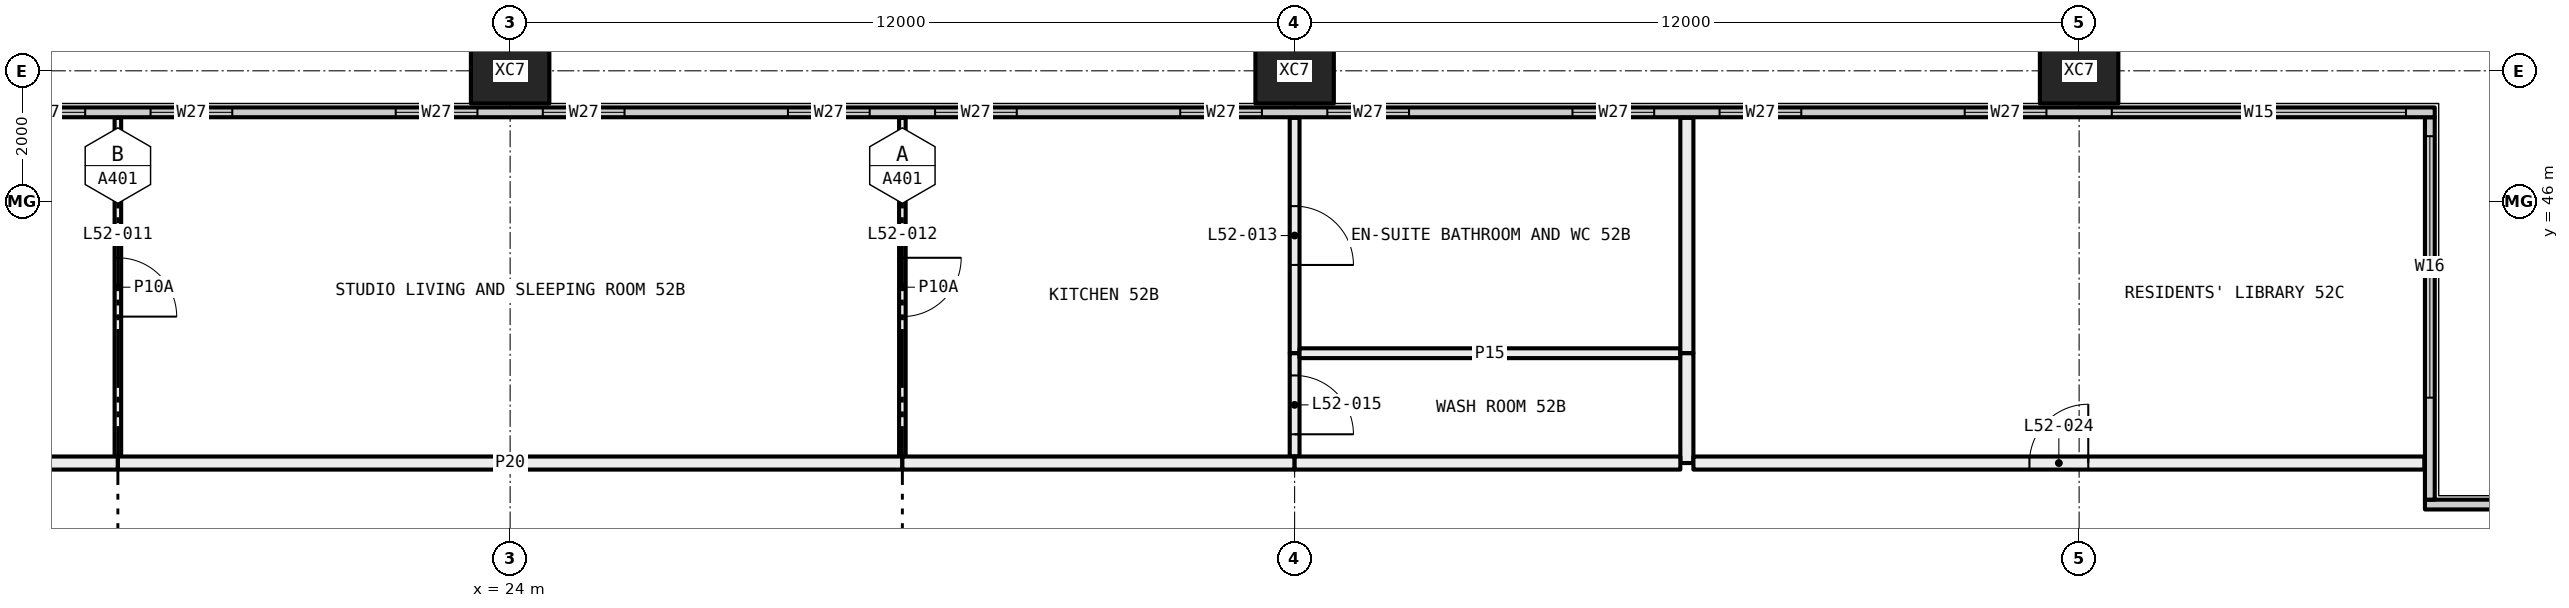
"""IFC4 building model, lengths in metres.
Left out: names, types, materials, properties, quantities, classifications, styles, units other than length and angle.
Written with IfcOpenShell. Run it as: python <this file> out.ifc"""

import sys

from ifc_helpers import new_model, si_unit, direction, frame, frame_2d, origin, origin_2d, place, context, subcontext, project, spatial, rectangle, hollow_rectangle, extrude, element, fill, save


model = new_model("IFC4")
c1 = context("Model", 3, precision=1e-05, world=origin(), true_north=direction((0.0, 1.0)))
c2 = subcontext(c1, "Body", "Model", "MODEL_VIEW")
j1 = project(units=[si_unit("LENGTHUNIT", "METRE"), si_unit("PLANEANGLEUNIT", "RADIAN")], contexts=[c1])
p1 = place(None, origin())
s1 = spatial("IfcSite", under=j1, at=p1, CompositionType="ELEMENT")
p2 = place(p1, origin())
s2 = spatial("IfcBuilding", under=s1, at=p2, CompositionType="ELEMENT")
p3 = place(p2, frame((0.0, 0.0, 196.2)))
s3 = spatial("IfcBuildingStorey", under=s2, at=p3, CompositionType="ELEMENT", Elevation=196.2)
for number, where, z_axis, x_axis in (
    (1, (24.0, 48.0, -0.4), (0.0, 0.0, 1.0), (1.0, 0.0, 0.0)),
    (2, (36.0, 48.0, -0.4), (0.0, 0.0, 1.0), (1.0, 0.0, 0.0)),
    (3, (48.0, 48.0, -0.4), (0.0, 0.0, 1.0), (1.0, 0.0, 0.0)),
):
    element("IfcColumn", number, at=place(p3, frame(where, z_axis=z_axis, x_axis=x_axis)), inside=s3, PredefinedType="COLUMN", context=c2, shape_type="SweptSolid", body=[
        extrude(hollow_rectangle(XDim=1.2, YDim=1.0, WallThickness=0.045, at=origin_2d()), origin(), (0.0, 0.0, 1.0), 3.45),
    ])
p4 = place(p3, frame((53.29, 41.365, 0.0), z_axis=(0.0, 0.0, 1.0), x_axis=(1.0, 0.0, 0.0)))
e4 = element("IfcWall", 4, at=p4, inside=s3, PredefinedType="ELEMENTEDWALL", context=c2, shape_type="SweptSolid", body=[
    extrude(rectangle(XDim=6.15, YDim=0.15, at=frame_2d((3.075, 0.0))), origin(), (0.0, 0.0, 1.0), 3.05),
])
p5 = place(p4, frame((1.71, 0.0, 0.45)))
e5 = element("IfcOpeningElement", 5, at=p5, cuts=e4, PredefinedType="OPENING", context=c2, shape_type="SweptSolid", body=[
    extrude(rectangle(XDim=4.0, YDim=2.55, at=frame_2d((2.0, 1.275))), frame((0.0, 0.085, 0.0), z_axis=(0.0, -1.0, 0.0), x_axis=(1.0, 0.0, 0.0)), (0.0, 0.0, 1.0), 0.17),
])
p6 = place(p3, frame((53.365, 41.44, 0.0), z_axis=(0.0, 0.0, 1.0), x_axis=(0.0, 1.0, 0.0)))
e6 = element("IfcWall", 6, at=p6, inside=s3, PredefinedType="ELEMENTEDWALL", context=c2, shape_type="SweptSolid", body=[
    extrude(rectangle(XDim=5.85, YDim=0.15, at=frame_2d((2.925, 0.0))), origin(), (0.0, 0.0, 1.0), 3.05),
])
p7 = place(p6, frame((1.56, 0.0, 0.45)))
e7 = element("IfcOpeningElement", 7, at=p7, cuts=e6, PredefinedType="OPENING", context=c2, shape_type="SweptSolid", body=[
    extrude(rectangle(XDim=4.0, YDim=2.55, at=frame_2d((2.0, 1.275))), frame((0.0, 0.085, 0.0), z_axis=(0.0, -1.0, 0.0), x_axis=(1.0, 0.0, 0.0)), (0.0, 0.0, 1.0), 0.17),
])
p8 = place(p3, frame((6.56, 47.365, 0.0), z_axis=(0.0, 0.0, 1.0), x_axis=(1.0, 0.0, 0.0)))
e8 = element("IfcWall", 8, at=p8, inside=s3, PredefinedType="ELEMENTEDWALL", context=c2, shape_type="SweptSolid", body=[
    extrude(rectangle(XDim=46.88, YDim=0.15, at=frame_2d((23.44, 0.0))), origin(), (0.0, 0.0, 1.0), 3.05),
])
p9 = place(p8, frame((0.44, 0.0, 0.45)))
e9 = element("IfcOpeningElement", 9, at=p9, cuts=e8, PredefinedType="OPENING", context=c2, shape_type="SweptSolid", body=[
    extrude(rectangle(XDim=4.5, YDim=2.55, at=frame_2d((2.25, 1.275))), frame((0.0, 0.085, 0.0), z_axis=(0.0, -1.0, 0.0), x_axis=(1.0, 0.0, 0.0)), (0.0, 0.0, 1.0), 0.17),
])
p10 = place(p8, frame((5.94, 0.0, 0.45)))
e10 = element("IfcOpeningElement", 10, at=p10, cuts=e8, PredefinedType="OPENING", context=c2, shape_type="SweptSolid", body=[
    extrude(rectangle(XDim=1.25, YDim=2.55, at=frame_2d((0.625, 1.275))), frame((0.0, 0.085, 0.0), z_axis=(0.0, -1.0, 0.0), x_axis=(1.0, 0.0, 0.0)), (0.0, 0.0, 1.0), 0.17),
])
p11 = place(p8, frame((9.69, 0.0, 0.45)))
e11 = element("IfcOpeningElement", 11, at=p11, cuts=e8, PredefinedType="OPENING", context=c2, shape_type="SweptSolid", body=[
    extrude(rectangle(XDim=1.25, YDim=2.55, at=frame_2d((0.625, 1.275))), frame((0.0, 0.085, 0.0), z_axis=(0.0, -1.0, 0.0), x_axis=(1.0, 0.0, 0.0)), (0.0, 0.0, 1.0), 0.17),
])
p12 = place(p8, frame((11.94, 0.0, 0.45)))
e12 = element("IfcOpeningElement", 12, at=p12, cuts=e8, PredefinedType="OPENING", context=c2, shape_type="SweptSolid", body=[
    extrude(rectangle(XDim=1.25, YDim=2.55, at=frame_2d((0.625, 1.275))), frame((0.0, 0.085, 0.0), z_axis=(0.0, -1.0, 0.0), x_axis=(1.0, 0.0, 0.0)), (0.0, 0.0, 1.0), 0.17),
])
p13 = place(p8, frame((15.69, 0.0, 0.45)))
e13 = element("IfcOpeningElement", 13, at=p13, cuts=e8, PredefinedType="OPENING", context=c2, shape_type="SweptSolid", body=[
    extrude(rectangle(XDim=1.25, YDim=2.55, at=frame_2d((0.625, 1.275))), frame((0.0, 0.085, 0.0), z_axis=(0.0, -1.0, 0.0), x_axis=(1.0, 0.0, 0.0)), (0.0, 0.0, 1.0), 0.17),
])
p14 = place(p8, frame((17.94, 0.0, 0.45)))
e14 = element("IfcOpeningElement", 14, at=p14, cuts=e8, PredefinedType="OPENING", context=c2, shape_type="SweptSolid", body=[
    extrude(rectangle(XDim=1.25, YDim=2.55, at=frame_2d((0.625, 1.275))), frame((0.0, 0.085, 0.0), z_axis=(0.0, -1.0, 0.0), x_axis=(1.0, 0.0, 0.0)), (0.0, 0.0, 1.0), 0.17),
])
p15 = place(p8, frame((21.69, 0.0, 0.45)))
e15 = element("IfcOpeningElement", 15, at=p15, cuts=e8, PredefinedType="OPENING", context=c2, shape_type="SweptSolid", body=[
    extrude(rectangle(XDim=1.25, YDim=2.55, at=frame_2d((0.625, 1.275))), frame((0.0, 0.085, 0.0), z_axis=(0.0, -1.0, 0.0), x_axis=(1.0, 0.0, 0.0)), (0.0, 0.0, 1.0), 0.17),
])
p16 = place(p8, frame((23.94, 0.0, 0.45)))
e16 = element("IfcOpeningElement", 16, at=p16, cuts=e8, PredefinedType="OPENING", context=c2, shape_type="SweptSolid", body=[
    extrude(rectangle(XDim=1.25, YDim=2.55, at=frame_2d((0.625, 1.275))), frame((0.0, 0.085, 0.0), z_axis=(0.0, -1.0, 0.0), x_axis=(1.0, 0.0, 0.0)), (0.0, 0.0, 1.0), 0.17),
])
p17 = place(p8, frame((27.69, 0.0, 0.45)))
e17 = element("IfcOpeningElement", 17, at=p17, cuts=e8, PredefinedType="OPENING", context=c2, shape_type="SweptSolid", body=[
    extrude(rectangle(XDim=1.25, YDim=2.55, at=frame_2d((0.625, 1.275))), frame((0.0, 0.085, 0.0), z_axis=(0.0, -1.0, 0.0), x_axis=(1.0, 0.0, 0.0)), (0.0, 0.0, 1.0), 0.17),
])
p18 = place(p8, frame((29.94, 0.0, 0.45)))
e18 = element("IfcOpeningElement", 18, at=p18, cuts=e8, PredefinedType="OPENING", context=c2, shape_type="SweptSolid", body=[
    extrude(rectangle(XDim=1.25, YDim=2.55, at=frame_2d((0.625, 1.275))), frame((0.0, 0.085, 0.0), z_axis=(0.0, -1.0, 0.0), x_axis=(1.0, 0.0, 0.0)), (0.0, 0.0, 1.0), 0.17),
])
p19 = place(p8, frame((33.69, 0.0, 0.45)))
e19 = element("IfcOpeningElement", 19, at=p19, cuts=e8, PredefinedType="OPENING", context=c2, shape_type="SweptSolid", body=[
    extrude(rectangle(XDim=1.25, YDim=2.55, at=frame_2d((0.625, 1.275))), frame((0.0, 0.085, 0.0), z_axis=(0.0, -1.0, 0.0), x_axis=(1.0, 0.0, 0.0)), (0.0, 0.0, 1.0), 0.17),
])
p20 = place(p8, frame((35.94, 0.0, 0.45)))
e20 = element("IfcOpeningElement", 20, at=p20, cuts=e8, PredefinedType="OPENING", context=c2, shape_type="SweptSolid", body=[
    extrude(rectangle(XDim=1.25, YDim=2.55, at=frame_2d((0.625, 1.275))), frame((0.0, 0.085, 0.0), z_axis=(0.0, -1.0, 0.0), x_axis=(1.0, 0.0, 0.0)), (0.0, 0.0, 1.0), 0.17),
])
p21 = place(p8, frame((39.69, 0.0, 0.45)))
e21 = element("IfcOpeningElement", 21, at=p21, cuts=e8, PredefinedType="OPENING", context=c2, shape_type="SweptSolid", body=[
    extrude(rectangle(XDim=1.25, YDim=2.55, at=frame_2d((0.625, 1.275))), frame((0.0, 0.085, 0.0), z_axis=(0.0, -1.0, 0.0), x_axis=(1.0, 0.0, 0.0)), (0.0, 0.0, 1.0), 0.17),
])
p22 = place(p8, frame((41.94, 0.0, 0.45)))
e22 = element("IfcOpeningElement", 22, at=p22, cuts=e8, PredefinedType="OPENING", context=c2, shape_type="SweptSolid", body=[
    extrude(rectangle(XDim=4.5, YDim=2.55, at=frame_2d((2.25, 1.275))), frame((0.0, 0.085, 0.0), z_axis=(0.0, -1.0, 0.0), x_axis=(1.0, 0.0, 0.0)), (0.0, 0.0, 1.0), 0.17),
])
p23 = place(p3, frame((18.0, 42.1, 0.0), z_axis=(0.0, 0.0, 1.0), x_axis=(0.0, 1.0, 0.0)))
e23 = element("IfcWall", 23, at=p23, inside=s3, PredefinedType="PARTITIONING", context=c2, shape_type="SweptSolid", body=[
    extrude(rectangle(XDim=5.18, YDim=0.1, at=frame_2d((2.59, 0.0))), origin(), (0.0, 0.0, 1.0), 3.05),
])
p24 = place(p23, frame((2.14, 0.0, 0.0)))
e24 = element("IfcOpeningElement", 24, at=p24, cuts=e23, PredefinedType="OPENING", context=c2, shape_type="SweptSolid", body=[
    extrude(rectangle(XDim=0.9, YDim=2.1, at=frame_2d((0.45, 1.05))), frame((0.0, 0.06, 0.0), z_axis=(0.0, -1.0, 0.0), x_axis=(1.0, 0.0, 0.0)), (0.0, 0.0, 1.0), 0.12),
])
p25 = place(p3, frame((12.0, 42.0, 0.0), z_axis=(0.0, 0.0, 1.0), x_axis=(1.0, 0.0, 0.0)))
e25 = element("IfcWall", 25, at=p25, inside=s3, PredefinedType="PARTITIONING", context=c2, shape_type="SweptSolid", body=[
    extrude(rectangle(XDim=6.0, YDim=0.2, at=frame_2d((3.0, 0.0))), origin(), (0.0, 0.0, 1.0), 3.05),
])
p26 = place(p25, frame((2.5, 0.0, 0.0)))
e26 = element("IfcOpeningElement", 26, at=p26, cuts=e25, PredefinedType="OPENING", context=c2, shape_type="SweptSolid", body=[
    extrude(rectangle(XDim=1.0, YDim=2.1, at=frame_2d((0.5, 1.05))), frame((0.0, 0.11, 0.0), z_axis=(0.0, -1.0, 0.0), x_axis=(1.0, 0.0, 0.0)), (0.0, 0.0, 1.0), 0.22),
])
p27 = place(p3, frame((30.0, 42.1, 0.0), z_axis=(0.0, 0.0, 1.0), x_axis=(0.0, 1.0, 0.0)))
e27 = element("IfcWall", 27, at=p27, inside=s3, PredefinedType="PARTITIONING", context=c2, shape_type="SweptSolid", body=[
    extrude(rectangle(XDim=5.18, YDim=0.1, at=frame_2d((2.59, 0.0))), origin(), (0.0, 0.0, 1.0), 3.05),
])
p28 = place(p27, frame((2.14, 0.0, 0.0)))
e28 = element("IfcOpeningElement", 28, at=p28, cuts=e27, PredefinedType="OPENING", context=c2, shape_type="SweptSolid", body=[
    extrude(rectangle(XDim=0.9, YDim=2.1, at=frame_2d((0.45, 1.05))), frame((0.0, 0.06, 0.0), z_axis=(0.0, -1.0, 0.0), x_axis=(1.0, 0.0, 0.0)), (0.0, 0.0, 1.0), 0.12),
])
p29 = place(p3, frame((18.0, 42.0, 0.0), z_axis=(0.0, 0.0, 1.0), x_axis=(1.0, 0.0, 0.0)))
e29 = element("IfcWall", 29, at=p29, inside=s3, PredefinedType="PARTITIONING", context=c2, shape_type="SweptSolid", body=[
    extrude(rectangle(XDim=12.0, YDim=0.2, at=frame_2d((6.0, 0.0))), origin(), (0.0, 0.0, 1.0), 3.05),
])
p30 = place(p3, frame((36.0, 43.68, 0.0), z_axis=(0.0, 0.0, 1.0), x_axis=(0.0, 1.0, 0.0)))
e30 = element("IfcWall", 30, at=p30, inside=s3, PredefinedType="PARTITIONING", context=c2, shape_type="SweptSolid", body=[
    extrude(rectangle(XDim=3.6, YDim=0.15, at=frame_2d((1.8, 0.0))), origin(), (0.0, 0.0, 1.0), 2.45),
])
p31 = place(p30, frame((1.35, 0.0, 0.0)))
e31 = element("IfcOpeningElement", 31, at=p31, cuts=e30, PredefinedType="OPENING", context=c2, shape_type="SweptSolid", body=[
    extrude(rectangle(XDim=0.9, YDim=2.1, at=frame_2d((0.45, 1.05))), frame((0.0, 0.085, 0.0), z_axis=(0.0, -1.0, 0.0), x_axis=(1.0, 0.0, 0.0)), (0.0, 0.0, 1.0), 0.17),
])
p32 = place(p3, frame((36.0, 42.1, 0.0), z_axis=(0.0, 0.0, 1.0), x_axis=(0.0, 1.0, 0.0)))
e32 = element("IfcWall", 32, at=p32, inside=s3, PredefinedType="PARTITIONING", context=c2, shape_type="SweptSolid", body=[
    extrude(rectangle(XDim=1.58, YDim=0.15, at=frame_2d((0.79, 0.0))), origin(), (0.0, 0.0, 1.0), 2.45),
])
p33 = place(p32, frame((0.34, 0.0, 0.0)))
e33 = element("IfcOpeningElement", 33, at=p33, cuts=e32, PredefinedType="OPENING", context=c2, shape_type="SweptSolid", body=[
    extrude(rectangle(XDim=0.9, YDim=2.1, at=frame_2d((0.45, 1.05))), frame((0.0, 0.085, 0.0), z_axis=(0.0, -1.0, 0.0), x_axis=(1.0, 0.0, 0.0)), (0.0, 0.0, 1.0), 0.17),
])
p34 = place(p3, frame((30.0, 42.0, 0.0), z_axis=(0.0, 0.0, 1.0), x_axis=(1.0, 0.0, 0.0)))
e34 = element("IfcWall", 34, at=p34, inside=s3, PredefinedType="PARTITIONING", context=c2, shape_type="SweptSolid", body=[
    extrude(rectangle(XDim=6.0, YDim=0.2, at=frame_2d((3.0, 0.0))), origin(), (0.0, 0.0, 1.0), 2.45),
])
p35 = place(p3, frame((36.075, 43.68, 0.0), z_axis=(0.0, 0.0, 1.0), x_axis=(1.0, 0.0, 0.0)))
e35 = element("IfcWall", 35, at=p35, inside=s3, PredefinedType="PARTITIONING", context=c2, shape_type="SweptSolid", body=[
    extrude(rectangle(XDim=5.825, YDim=0.15, at=frame_2d((2.913, 0.0))), origin(), (0.0, 0.0, 1.0), 2.45),
])
p36 = place(p3, frame((42.0, 43.68, 0.0), z_axis=(0.0, 0.0, 1.0), x_axis=(0.0, 1.0, 0.0)))
e36 = element("IfcWall", 36, at=p36, inside=s3, PredefinedType="PARTITIONING", context=c2, shape_type="SweptSolid", body=[
    extrude(rectangle(XDim=3.6, YDim=0.2, at=frame_2d((1.8, 0.0))), origin(), (0.0, 0.0, 1.0), 3.05),
])
p37 = place(p3, frame((42.0, 42.0, 0.0), z_axis=(0.0, 0.0, 1.0), x_axis=(0.0, 1.0, 0.0)))
e37 = element("IfcWall", 37, at=p37, inside=s3, PredefinedType="PARTITIONING", context=c2, shape_type="SweptSolid", body=[
    extrude(rectangle(XDim=1.68, YDim=0.2, at=frame_2d((0.84, 0.0))), origin(), (0.0, 0.0, 1.0), 3.05),
])
p38 = place(p3, frame((36.0, 42.0, 0.0), z_axis=(0.0, 0.0, 1.0), x_axis=(1.0, 0.0, 0.0)))
e38 = element("IfcWall", 38, at=p38, inside=s3, PredefinedType="PARTITIONING", context=c2, shape_type="SweptSolid", body=[
    extrude(rectangle(XDim=5.9, YDim=0.2, at=frame_2d((2.95, 0.0))), origin(), (0.0, 0.0, 1.0), 2.45),
])
p39 = place(p3, frame((42.1, 42.0, 0.0), z_axis=(0.0, 0.0, 1.0), x_axis=(1.0, 0.0, 0.0)))
e39 = element("IfcWall", 39, at=p39, inside=s3, PredefinedType="PARTITIONING", context=c2, shape_type="SweptSolid", body=[
    extrude(rectangle(XDim=11.18, YDim=0.2, at=frame_2d((5.59, 0.0))), origin(), (0.0, 0.0, 1.0), 3.05),
])
p40 = place(p39, frame((5.14, 0.0, 0.0)))
e40 = element("IfcOpeningElement", 40, at=p40, cuts=e39, PredefinedType="OPENING", context=c2, shape_type="SweptSolid", body=[
    extrude(rectangle(XDim=0.9, YDim=2.1, at=frame_2d((0.45, 1.05))), frame((0.0, 0.11, 0.0), z_axis=(0.0, -1.0, 0.0), x_axis=(1.0, 0.0, 0.0)), (0.0, 0.0, 1.0), 0.22),
])
p41 = place(p7, origin())
e41 = element("IfcWindow", 41, at=p41, inside=s3, PartitioningType="SINGLE_PANEL", PredefinedType="WINDOW", context=c2, shape_type="SweptSolid", body=[
    extrude(rectangle(XDim=4.0, YDim=2.55, at=frame_2d((2.0, 1.275))), frame((0.0, 0.03, 0.0), z_axis=(0.0, -1.0, 0.0), x_axis=(1.0, 0.0, 0.0)), (0.0, 0.0, 1.0), 0.06),
])
fill(e7, e41)
p42 = place(p11, origin())
e42 = element("IfcWindow", 42, at=p42, inside=s3, PartitioningType="SINGLE_PANEL", PredefinedType="WINDOW", context=c2, shape_type="SweptSolid", body=[
    extrude(rectangle(XDim=1.25, YDim=2.55, at=frame_2d((0.625, 1.275))), frame((0.0, 0.03, 0.0), z_axis=(0.0, -1.0, 0.0), x_axis=(1.0, 0.0, 0.0)), (0.0, 0.0, 1.0), 0.06),
])
fill(e11, e42)
p43 = place(p12, origin())
e43 = element("IfcWindow", 43, at=p43, inside=s3, PartitioningType="SINGLE_PANEL", PredefinedType="WINDOW", context=c2, shape_type="SweptSolid", body=[
    extrude(rectangle(XDim=1.25, YDim=2.55, at=frame_2d((0.625, 1.275))), frame((0.0, 0.03, 0.0), z_axis=(0.0, -1.0, 0.0), x_axis=(1.0, 0.0, 0.0)), (0.0, 0.0, 1.0), 0.06),
])
fill(e12, e43)
p44 = place(p13, origin())
e44 = element("IfcWindow", 44, at=p44, inside=s3, PartitioningType="SINGLE_PANEL", PredefinedType="WINDOW", context=c2, shape_type="SweptSolid", body=[
    extrude(rectangle(XDim=1.25, YDim=2.55, at=frame_2d((0.625, 1.275))), frame((0.0, 0.03, 0.0), z_axis=(0.0, -1.0, 0.0), x_axis=(1.0, 0.0, 0.0)), (0.0, 0.0, 1.0), 0.06),
])
fill(e13, e44)
p45 = place(p14, origin())
e45 = element("IfcWindow", 45, at=p45, inside=s3, PartitioningType="SINGLE_PANEL", PredefinedType="WINDOW", context=c2, shape_type="SweptSolid", body=[
    extrude(rectangle(XDim=1.25, YDim=2.55, at=frame_2d((0.625, 1.275))), frame((0.0, 0.03, 0.0), z_axis=(0.0, -1.0, 0.0), x_axis=(1.0, 0.0, 0.0)), (0.0, 0.0, 1.0), 0.06),
])
fill(e14, e45)
p46 = place(p15, origin())
e46 = element("IfcWindow", 46, at=p46, inside=s3, PartitioningType="SINGLE_PANEL", PredefinedType="WINDOW", context=c2, shape_type="SweptSolid", body=[
    extrude(rectangle(XDim=1.25, YDim=2.55, at=frame_2d((0.625, 1.275))), frame((0.0, 0.03, 0.0), z_axis=(0.0, -1.0, 0.0), x_axis=(1.0, 0.0, 0.0)), (0.0, 0.0, 1.0), 0.06),
])
fill(e15, e46)
p47 = place(p16, origin())
e47 = element("IfcWindow", 47, at=p47, inside=s3, PartitioningType="SINGLE_PANEL", PredefinedType="WINDOW", context=c2, shape_type="SweptSolid", body=[
    extrude(rectangle(XDim=1.25, YDim=2.55, at=frame_2d((0.625, 1.275))), frame((0.0, 0.03, 0.0), z_axis=(0.0, -1.0, 0.0), x_axis=(1.0, 0.0, 0.0)), (0.0, 0.0, 1.0), 0.06),
])
fill(e16, e47)
p48 = place(p17, origin())
e48 = element("IfcWindow", 48, at=p48, inside=s3, PartitioningType="SINGLE_PANEL", PredefinedType="WINDOW", context=c2, shape_type="SweptSolid", body=[
    extrude(rectangle(XDim=1.25, YDim=2.55, at=frame_2d((0.625, 1.275))), frame((0.0, 0.03, 0.0), z_axis=(0.0, -1.0, 0.0), x_axis=(1.0, 0.0, 0.0)), (0.0, 0.0, 1.0), 0.06),
])
fill(e17, e48)
p49 = place(p18, origin())
e49 = element("IfcWindow", 49, at=p49, inside=s3, PartitioningType="SINGLE_PANEL", PredefinedType="WINDOW", context=c2, shape_type="SweptSolid", body=[
    extrude(rectangle(XDim=1.25, YDim=2.55, at=frame_2d((0.625, 1.275))), frame((0.0, 0.03, 0.0), z_axis=(0.0, -1.0, 0.0), x_axis=(1.0, 0.0, 0.0)), (0.0, 0.0, 1.0), 0.06),
])
fill(e18, e49)
p50 = place(p19, origin())
e50 = element("IfcWindow", 50, at=p50, inside=s3, PartitioningType="SINGLE_PANEL", PredefinedType="WINDOW", context=c2, shape_type="SweptSolid", body=[
    extrude(rectangle(XDim=1.25, YDim=2.55, at=frame_2d((0.625, 1.275))), frame((0.0, 0.03, 0.0), z_axis=(0.0, -1.0, 0.0), x_axis=(1.0, 0.0, 0.0)), (0.0, 0.0, 1.0), 0.06),
])
fill(e19, e50)
p51 = place(p20, origin())
e51 = element("IfcWindow", 51, at=p51, inside=s3, PartitioningType="SINGLE_PANEL", PredefinedType="WINDOW", context=c2, shape_type="SweptSolid", body=[
    extrude(rectangle(XDim=1.25, YDim=2.55, at=frame_2d((0.625, 1.275))), frame((0.0, 0.03, 0.0), z_axis=(0.0, -1.0, 0.0), x_axis=(1.0, 0.0, 0.0)), (0.0, 0.0, 1.0), 0.06),
])
fill(e20, e51)
p52 = place(p21, origin())
e52 = element("IfcWindow", 52, at=p52, inside=s3, PartitioningType="SINGLE_PANEL", PredefinedType="WINDOW", context=c2, shape_type="SweptSolid", body=[
    extrude(rectangle(XDim=1.25, YDim=2.55, at=frame_2d((0.625, 1.275))), frame((0.0, 0.03, 0.0), z_axis=(0.0, -1.0, 0.0), x_axis=(1.0, 0.0, 0.0)), (0.0, 0.0, 1.0), 0.06),
])
fill(e21, e52)
p53 = place(p22, origin())
e53 = element("IfcWindow", 53, at=p53, inside=s3, PartitioningType="SINGLE_PANEL", PredefinedType="WINDOW", context=c2, shape_type="SweptSolid", body=[
    extrude(rectangle(XDim=4.5, YDim=2.55, at=frame_2d((2.25, 1.275))), frame((0.0, 0.03, 0.0), z_axis=(0.0, -1.0, 0.0), x_axis=(1.0, 0.0, 0.0)), (0.0, 0.0, 1.0), 0.06),
])
fill(e22, e53)
p54 = place(p24, frame((0.9, 0.0, 0.0), x_axis=(-1.0, 0.0, 0.0)))
e54 = element("IfcDoor", 54, at=p54, inside=s3, OperationType="SINGLE_SWING_LEFT", PredefinedType="DOOR", context=c2, shape_type="SweptSolid", body=[
    extrude(rectangle(XDim=0.9, YDim=2.1, at=frame_2d((0.45, 1.05))), frame((0.0, 0.025, 0.0), z_axis=(0.0, -1.0, 0.0), x_axis=(1.0, 0.0, 0.0)), (0.0, 0.0, 1.0), 0.05),
])
fill(e24, e54)
p55 = place(p28, frame((0.9, 0.0, 0.0), x_axis=(-1.0, 0.0, 0.0)))
e55 = element("IfcDoor", 55, at=p55, inside=s3, OperationType="SINGLE_SWING_RIGHT", PredefinedType="DOOR", context=c2, shape_type="SweptSolid", body=[
    extrude(rectangle(XDim=0.9, YDim=2.1, at=frame_2d((0.45, 1.05))), frame((0.0, 0.025, 0.0), z_axis=(0.0, -1.0, 0.0), x_axis=(1.0, 0.0, 0.0)), (0.0, 0.0, 1.0), 0.05),
])
fill(e28, e55)
p56 = place(p31, frame((0.9, 0.0, 0.0), x_axis=(-1.0, 0.0, 0.0)))
e56 = element("IfcDoor", 56, at=p56, inside=s3, OperationType="SINGLE_SWING_LEFT", PredefinedType="DOOR", context=c2, shape_type="SweptSolid", body=[
    extrude(rectangle(XDim=0.9, YDim=2.1, at=frame_2d((0.45, 1.05))), frame((0.0, 0.025, 0.0), z_axis=(0.0, -1.0, 0.0), x_axis=(1.0, 0.0, 0.0)), (0.0, 0.0, 1.0), 0.05),
])
fill(e31, e56)
p57 = place(p33, frame((0.9, 0.0, 0.0), x_axis=(-1.0, 0.0, 0.0)))
e57 = element("IfcDoor", 57, at=p57, inside=s3, OperationType="SINGLE_SWING_LEFT", PredefinedType="DOOR", context=c2, shape_type="SweptSolid", body=[
    extrude(rectangle(XDim=0.9, YDim=2.1, at=frame_2d((0.45, 1.05))), frame((0.0, 0.025, 0.0), z_axis=(0.0, -1.0, 0.0), x_axis=(1.0, 0.0, 0.0)), (0.0, 0.0, 1.0), 0.05),
])
fill(e33, e57)
p58 = place(p40, origin())
e58 = element("IfcDoor", 58, at=p58, inside=s3, OperationType="SINGLE_SWING_LEFT", PredefinedType="DOOR", context=c2, shape_type="SweptSolid", body=[
    extrude(rectangle(XDim=0.9, YDim=2.1, at=frame_2d((0.45, 1.05))), frame((0.0, 0.025, 0.0), z_axis=(0.0, -1.0, 0.0), x_axis=(1.0, 0.0, 0.0)), (0.0, 0.0, 1.0), 0.05),
])
fill(e40, e58)
save(model, sys.argv[1])
